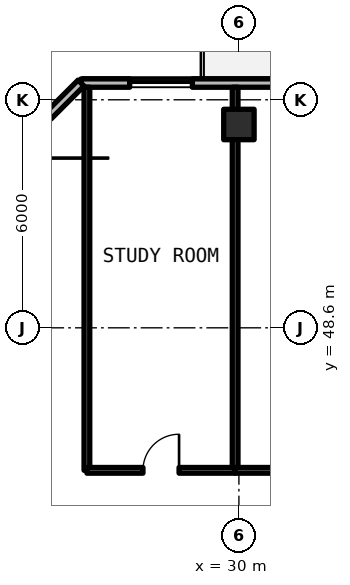
"""IFC4 building model, lengths in metres.
Left out: names, types, materials, properties, quantities, classifications, styles, units other than length and angle.
Written with IfcOpenShell. Run it as: python <this file> out.ifc"""

import sys

from ifc_helpers import new_model, si_unit, direction, frame, frame_2d, origin, origin_2d, place, context, subcontext, project, spatial, rectangle, extrude, element, fill, save


model = new_model("IFC4")
c1 = context("Model", 3, precision=1e-05, world=origin(), true_north=direction((0.0, 1.0)))
c2 = subcontext(c1, "Body", "Model", "MODEL_VIEW")
j1 = project(units=[si_unit("LENGTHUNIT", "METRE"), si_unit("PLANEANGLEUNIT", "RADIAN")], contexts=[c1])
p1 = place(None, origin())
s1 = spatial("IfcSite", under=j1, at=p1, CompositionType="ELEMENT")
p2 = place(p1, origin())
s2 = spatial("IfcBuilding", under=s1, at=p2, CompositionType="ELEMENT")
p3 = place(p2, frame((0.0, 0.0, 198.33)))
s3 = spatial("IfcBuildingStorey", under=s2, at=p3, CompositionType="ELEMENT", Elevation=198.33)
p4 = place(p3, frame((30.0, 53.95, 0.0), z_axis=(0.0, 0.0, 1.0), x_axis=(1.0, 0.0, 0.0)))
e1 = element("IfcColumn", 1, at=p4, inside=s3, PredefinedType="COLUMN", context=c2, shape_type="SweptSolid", body=[
    extrude(rectangle(XDim=0.8, YDim=0.8, at=origin_2d()), origin(), (0.0, 0.0, 1.0), 3.3),
])
p5 = place(p3, frame((43.49, 55.04, 0.0), z_axis=(0.0, 0.0, 1.0), x_axis=(-1.0, 0.0, 0.0)))
e2 = element("IfcWall", 2, at=p5, inside=s3, PredefinedType="SOLIDWALL", context=c2, shape_type="SweptSolid", body=[
    extrude(rectangle(XDim=17.644, YDim=0.22, at=frame_2d((8.822, 0.0))), origin(), (0.0, 0.0, 1.0), 3.08),
])
p6 = place(p5, frame((9.34, 0.0, 0.0)))
e3 = element("IfcOpeningElement", 3, at=p6, cuts=e2, PredefinedType="OPENING", context=c2, shape_type="SweptSolid", body=[
    extrude(rectangle(XDim=1.1, YDim=2.15, at=frame_2d((0.55, 1.075))), frame((0.0, 0.12, 0.0), z_axis=(0.0, -1.0, 0.0), x_axis=(1.0, 0.0, 0.0)), (0.0, 0.0, 1.0), 0.24),
])
p7 = place(p5, frame((14.715, 0.0, 0.78)))
e4 = element("IfcOpeningElement", 4, at=p7, cuts=e2, PredefinedType="OPENING", context=c2, shape_type="SweptSolid", body=[
    extrude(rectangle(XDim=1.65, YDim=1.66, at=frame_2d((0.825, 0.83))), frame((0.0, 0.12, 0.0), z_axis=(0.0, -1.0, 0.0), x_axis=(1.0, 0.0, 0.0)), (0.0, 0.0, 1.0), 0.24),
])
p8 = place(p5, frame((4.932, 0.0, 0.78)))
e5 = element("IfcOpeningElement", 5, at=p8, cuts=e2, PredefinedType="OPENING", context=c2, shape_type="SweptSolid", body=[
    extrude(rectangle(XDim=1.65, YDim=1.66, at=frame_2d((0.825, 0.83))), frame((0.0, 0.12, 0.0), z_axis=(0.0, -1.0, 0.0), x_axis=(1.0, 0.0, 0.0)), (0.0, 0.0, 1.0), 0.24),
])
p9 = place(p5, frame((2.407, 0.0, 0.78)))
e6 = element("IfcOpeningElement", 6, at=p9, cuts=e2, PredefinedType="OPENING", context=c2, shape_type="SweptSolid", body=[
    extrude(rectangle(XDim=0.85, YDim=1.65, at=frame_2d((0.425, 0.825))), frame((0.0, 0.12, 0.0), z_axis=(0.0, -1.0, 0.0), x_axis=(1.0, 0.0, 0.0)), (0.0, 0.0, 1.0), 0.24),
])
p10 = place(p3, frame((25.846, 55.04, 0.0), z_axis=(0.0, 0.0, 1.0), x_axis=(-0.707106781187, -0.707106781187, 0.0)))
e7 = element("IfcWall", 7, at=p10, inside=s3, PredefinedType="SOLIDWALL", context=c2, shape_type="SweptSolid", body=[
    extrude(rectangle(XDim=5.849, YDim=0.22, at=frame_2d((2.924, 0.0))), origin(), (0.0, 0.0, 1.0), 3.08),
])
p11 = place(p10, frame((1.224, 0.0, 0.78)))
e8 = element("IfcOpeningElement", 8, at=p11, cuts=e7, PredefinedType="OPENING", context=c2, shape_type="SweptSolid", body=[
    extrude(rectangle(XDim=3.4, YDim=1.66, at=frame_2d((1.7, 0.83))), frame((0.0, 0.12, 0.0), z_axis=(0.0, -1.0, 0.0), x_axis=(1.0, 0.0, 0.0)), (0.0, 0.0, 1.0), 0.24),
])
for number, where, z_axis, x_axis in (
    (9, (26.0, 44.85, 0.0), (0.0, 0.0, 1.0), (0.0, 1.0, 0.0)),
    (10, (29.9, 44.85, 0.0), (0.0, 0.0, 1.0), (0.0, 1.0, 0.0)),
):
    element("IfcWall", number, at=place(p3, frame(where, z_axis=z_axis, x_axis=x_axis)), inside=s3, PredefinedType="SOLIDWALL", context=c2, shape_type="SweptSolid", body=[
        extrude(rectangle(XDim=10.08, YDim=0.15, at=frame_2d((5.04, 0.0))), origin(), (0.0, 0.0, 1.0), 2.35),
    ])
p12 = place(p3, frame((26.0, 44.85, 0.0), z_axis=(0.0, 0.0, 1.0), x_axis=(1.0, 0.0, 0.0)))
e11 = element("IfcWall", 11, at=p12, inside=s3, PredefinedType="SOLIDWALL", context=c2, shape_type="SweptSolid", body=[
    extrude(rectangle(XDim=3.9, YDim=0.15, at=frame_2d((1.95, 0.0))), origin(), (0.0, 0.0, 1.0), 2.35),
])
p13 = place(p12, frame((1.475, 0.0, 0.0)))
e12 = element("IfcOpeningElement", 12, at=p13, cuts=e11, PredefinedType="OPENING", context=c2, shape_type="SweptSolid", body=[
    extrude(rectangle(XDim=0.95, YDim=2.15, at=frame_2d((0.475, 1.075))), frame((0.0, 0.085, 0.0), z_axis=(0.0, -1.0, 0.0), x_axis=(1.0, 0.0, 0.0)), (0.0, 0.0, 1.0), 0.17),
])
p14 = place(p3, frame((29.9, 44.85, 0.0), z_axis=(0.0, 0.0, 1.0), x_axis=(1.0, 0.0, 0.0)))
e13 = element("IfcWall", 13, at=p14, inside=s3, PredefinedType="SOLIDWALL", context=c2, shape_type="SweptSolid", body=[
    extrude(rectangle(XDim=5.49, YDim=0.15, at=frame_2d((2.745, 0.0))), origin(), (0.0, 0.0, 1.0), 2.35),
])
p15 = place(p14, frame((2.195, 0.0, 0.0)))
e14 = element("IfcOpeningElement", 14, at=p15, cuts=e13, PredefinedType="OPENING", context=c2, shape_type="SweptSolid", body=[
    extrude(rectangle(XDim=1.1, YDim=2.15, at=frame_2d((0.55, 1.075))), frame((0.0, 0.085, 0.0), z_axis=(0.0, -1.0, 0.0), x_axis=(1.0, 0.0, 0.0)), (0.0, 0.0, 1.0), 0.17),
])
p16 = place(p7, origin())
e15 = element("IfcWindow", 15, at=p16, inside=s3, PartitioningType="SINGLE_PANEL", PredefinedType="WINDOW", context=c2, shape_type="SweptSolid", body=[
    extrude(rectangle(XDim=1.65, YDim=1.66, at=frame_2d((0.825, 0.83))), frame((0.0, 0.03, 0.0), z_axis=(0.0, -1.0, 0.0), x_axis=(1.0, 0.0, 0.0)), (0.0, 0.0, 1.0), 0.06),
])
fill(e4, e15)
p17 = place(p13, origin())
e16 = element("IfcDoor", 16, at=p17, inside=s3, OperationType="SINGLE_SWING_RIGHT", PredefinedType="DOOR", context=c2, shape_type="SweptSolid", body=[
    extrude(rectangle(XDim=0.95, YDim=2.15, at=frame_2d((0.475, 1.075))), frame((0.0, 0.025, 0.0), z_axis=(0.0, -1.0, 0.0), x_axis=(1.0, 0.0, 0.0)), (0.0, 0.0, 1.0), 0.05),
])
fill(e12, e16)
save(model, sys.argv[1])
